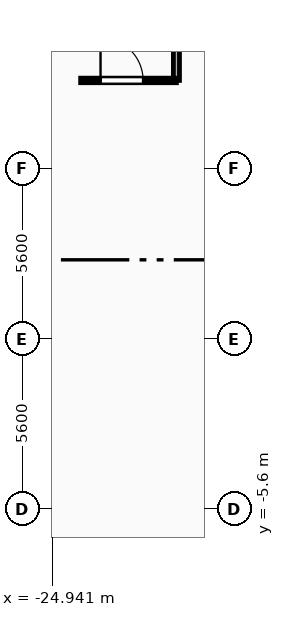
"""IFC4 building model, lengths in metres.
Left out: names, types, materials, properties, quantities, classifications, styles, units other than length and angle.
Written with IfcOpenShell. Run it as: python <this file> out.ifc"""

import sys

from ifc_helpers import new_model, si_unit, direction, frame, frame_2d, origin, place, context, subcontext, project, spatial, rectangle, extrude, element, fill, save


model = new_model("IFC4")
c1 = context("Model", 3, precision=1e-05, world=origin(), true_north=direction((0.0, 1.0)))
c2 = subcontext(c1, "Body", "Model", "MODEL_VIEW")
j1 = project(units=[si_unit("LENGTHUNIT", "METRE"), si_unit("PLANEANGLEUNIT", "RADIAN")], contexts=[c1])
p1 = place(None, origin())
s1 = spatial("IfcSite", under=j1, at=p1, CompositionType="ELEMENT")
p2 = place(p1, origin())
s2 = spatial("IfcBuilding", under=s1, at=p2, CompositionType="ELEMENT")
p3 = place(p2, origin())
s3 = spatial("IfcBuildingStorey", under=s2, at=p3, CompositionType="ELEMENT", Elevation=0.0)
p4 = place(p3, frame((-20.85, 8.5, 0.0), z_axis=(0.0, 0.0, 1.0), x_axis=(0.0, 1.0, 0.0)))
e1 = element("IfcWall", 1, at=p4, inside=s3, PredefinedType="PARTITIONING", context=c2, shape_type="SweptSolid", body=[
    extrude(rectangle(XDim=16.3, YDim=0.2, at=frame_2d((8.15, 0.0))), origin(), (0.0, 0.0, 1.0), 4.17),
])
p5 = place(p3, frame((-24.0, 8.5, 0.0), z_axis=(0.0, 0.0, 1.0), x_axis=(1.0, 0.0, 0.0)))
e2 = element("IfcWall", 2, at=p5, inside=s3, PredefinedType="PARTITIONING", context=c2, shape_type="SweptSolid", body=[
    extrude(rectangle(XDim=3.15, YDim=0.15, at=frame_2d((1.575, 0.0))), origin(), (0.0, 0.0, 1.0), 4.17),
])
p6 = place(p5, frame((0.654, 0.0, 0.0)))
e3 = element("IfcOpeningElement", 3, at=p6, cuts=e2, PredefinedType="OPENING", context=c2, shape_type="SweptSolid", body=[
    extrude(rectangle(XDim=1.4, YDim=2.3, at=frame_2d((0.7, 1.15))), frame((0.0, 0.085, 0.0), z_axis=(0.0, -1.0, 0.0), x_axis=(1.0, 0.0, 0.0)), (0.0, 0.0, 1.0), 0.17),
])
p7 = place(p6, origin())
e4 = element("IfcDoor", 4, at=p7, inside=s3, OperationType="SINGLE_SWING_LEFT", PredefinedType="DOOR", context=c2, shape_type="SweptSolid", body=[
    extrude(rectangle(XDim=1.4, YDim=2.3, at=frame_2d((0.7, 1.15))), frame((0.0, 0.025, 0.0), z_axis=(0.0, -1.0, 0.0), x_axis=(1.0, 0.0, 0.0)), (0.0, 0.0, 1.0), 0.05),
])
fill(e3, e4)
save(model, sys.argv[1])
